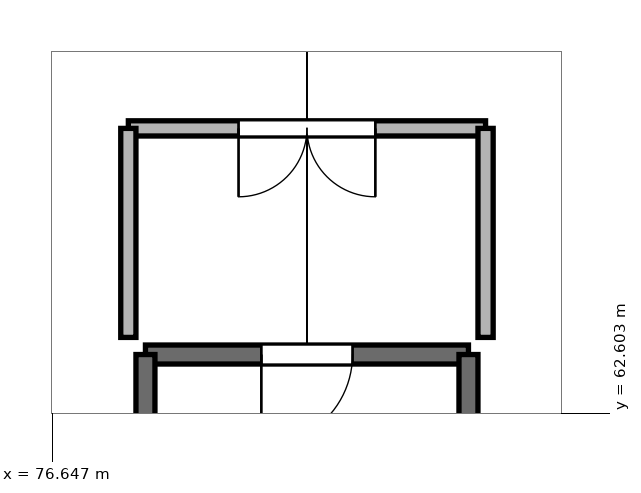
"""IFC4 building model, lengths in metres.
Left out: names, types, materials, properties, quantities, classifications, styles, units other than length and angle.
Written with IfcOpenShell. Run it as: python <this file> out.ifc"""

import sys

from ifc_helpers import new_model, si_unit, direction, frame, frame_2d, origin, place, context, subcontext, project, spatial, rectangle, extrude, element, fill, save


model = new_model("IFC4")
c1 = context("Model", 3, precision=1e-05, world=origin(), true_north=direction((0.0, 1.0)))
c2 = subcontext(c1, "Body", "Model", "MODEL_VIEW")
j1 = project(units=[si_unit("LENGTHUNIT", "METRE"), si_unit("PLANEANGLEUNIT", "RADIAN")], contexts=[c1])
p1 = place(None, origin())
s1 = spatial("IfcSite", under=j1, at=p1, CompositionType="ELEMENT")
p2 = place(p1, origin())
s2 = spatial("IfcBuilding", under=s1, at=p2, CompositionType="ELEMENT")
p3 = place(p2, frame((0.0, 0.0, 50.3)))
s3 = spatial("IfcBuildingStorey", under=s2, at=p3, CompositionType="ELEMENT", Elevation=50.3)
p4 = place(p3, frame((82.125, 63.375, 0.0), z_axis=(0.0, 0.0, 1.0), x_axis=(-1.0, 0.0, 0.0)))
e1 = element("IfcWall", 1, at=p4, inside=s3, PredefinedType="SHEAR", context=c2, shape_type="SweptSolid", body=[
    extrude(rectangle(XDim=4.25, YDim=0.25, at=frame_2d((2.125, 0.0))), origin(), (0.0, 0.0, 1.0), 3.03),
])
p5 = place(p4, frame((1.525, 0.0, 0.0)))
e2 = element("IfcOpeningElement", 2, at=p5, cuts=e1, PredefinedType="OPENING", context=c2, shape_type="SweptSolid", body=[
    extrude(rectangle(XDim=1.2, YDim=2.2, at=frame_2d((0.6, 1.1))), frame((0.0, 0.137, 0.0), z_axis=(0.0, -1.0, 0.0), x_axis=(1.0, 0.0, 0.0)), (0.0, 0.0, 1.0), 0.274),
])
for number, where, z_axis, x_axis in (
    (3, (77.875, 63.375, 0.0), (0.0, 0.0, 1.0), (0.0, -1.0, 0.0)),
    (4, (82.125, 56.175, 0.0), (0.0, 0.0, 1.0), (0.0, 1.0, 0.0)),
):
    element("IfcWall", number, at=place(p3, frame(where, z_axis=z_axis, x_axis=x_axis)), inside=s3, PredefinedType="SHEAR", context=c2, shape_type="SweptSolid", body=[
        extrude(rectangle(XDim=7.2, YDim=0.25, at=frame_2d((3.6, 0.0))), origin(), (0.0, 0.0, 1.0), 3.03),
    ])
p6 = place(p3, frame((77.65, 66.35, 0.0), z_axis=(0.0, 0.0, 1.0), x_axis=(1.0, 0.0, 0.0)))
e5 = element("IfcWall", 5, at=p6, inside=s3, PredefinedType="PARTITIONING", context=c2, shape_type="SweptSolid", body=[
    extrude(rectangle(XDim=4.7, YDim=0.2, at=frame_2d((2.35, 0.0))), origin(), (0.0, 0.0, 1.0), 2.53),
])
p7 = place(p6, frame((1.45, 0.0, 0.0)))
e6 = element("IfcOpeningElement", 6, at=p7, cuts=e5, PredefinedType="OPENING", context=c2, shape_type="SweptSolid", body=[
    extrude(rectangle(XDim=1.8, YDim=2.2, at=frame_2d((0.9, 1.1))), frame((0.0, 0.112, 0.0), z_axis=(0.0, -1.0, 0.0), x_axis=(1.0, 0.0, 0.0)), (0.0, 0.0, 1.0), 0.224),
])
for number, where, z_axis, x_axis in (
    (7, (77.65, 63.6, 0.0), (0.0, 0.0, 1.0), (0.0, 1.0, 0.0)),
    (8, (82.35, 63.6, 0.0), (0.0, 0.0, 1.0), (0.0, 1.0, 0.0)),
):
    element("IfcWall", number, at=place(p3, frame(where, z_axis=z_axis, x_axis=x_axis)), inside=s3, PredefinedType="PARTITIONING", context=c2, shape_type="SweptSolid", body=[
        extrude(rectangle(XDim=2.75, YDim=0.2, at=frame_2d((1.375, 0.0))), origin(), (0.0, 0.0, 1.0), 2.53),
    ])
p8 = place(p5, origin())
e9 = element("IfcDoor", 9, at=p8, inside=s3, OperationType="SINGLE_SWING_RIGHT", PredefinedType="DOOR", context=c2, shape_type="SweptSolid", body=[
    extrude(rectangle(XDim=1.2, YDim=2.2, at=frame_2d((0.6, 1.1))), frame((0.0, 0.025, 0.0), z_axis=(0.0, -1.0, 0.0), x_axis=(1.0, 0.0, 0.0)), (0.0, 0.0, 1.0), 0.05),
])
fill(e2, e9)
p9 = place(p7, frame((1.8, 0.0, 0.0), z_axis=(0.0, 0.0, 1.0), x_axis=(-1.0, 0.0, 0.0)))
e10 = element("IfcDoor", 10, at=p9, inside=s3, OperationType="DOUBLE_DOOR_SINGLE_SWING", PredefinedType="DOOR", context=c2, shape_type="SweptSolid", body=[
    extrude(rectangle(XDim=1.8, YDim=2.2, at=frame_2d((0.9, 1.1))), frame((0.0, 0.025, 0.0), z_axis=(0.0, -1.0, 0.0), x_axis=(1.0, 0.0, 0.0)), (0.0, 0.0, 1.0), 0.05),
])
fill(e6, e10)
save(model, sys.argv[1])
